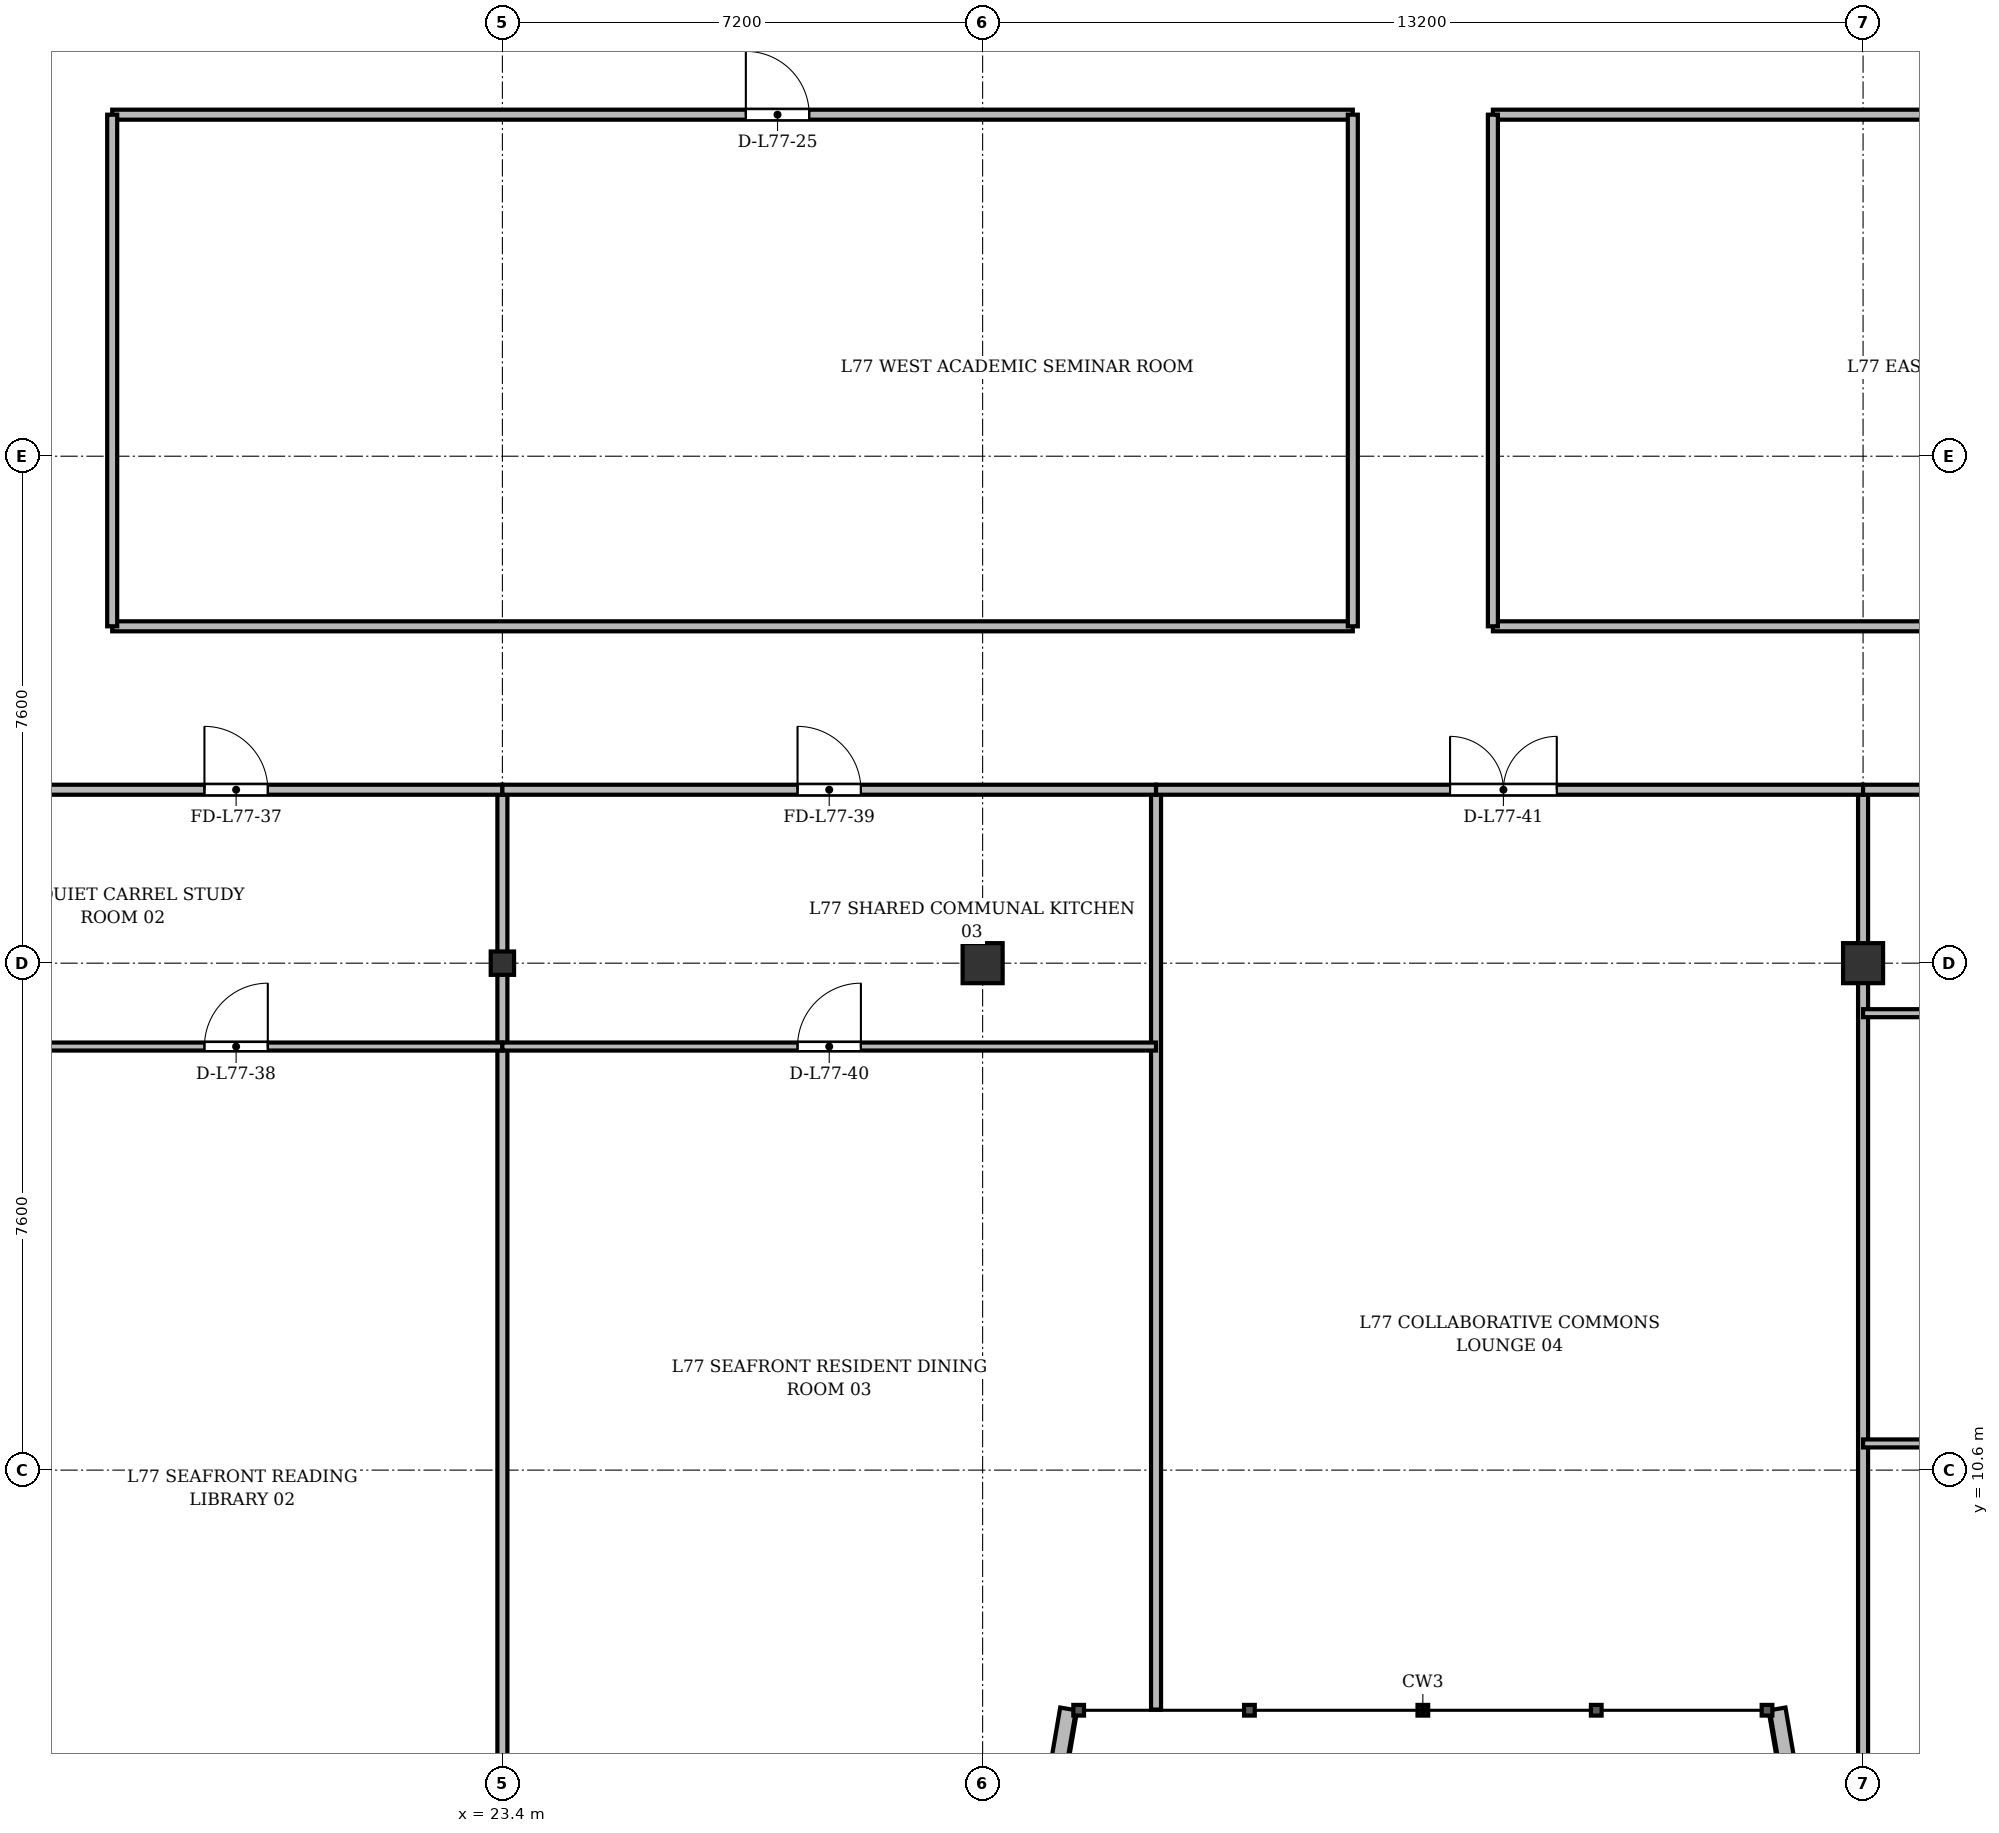
"""IFC4 building model, lengths in metres.
Left out: names, types, materials, properties, quantities, classifications, styles, units other than length and angle.
Written with IfcOpenShell. Run it as: python <this file> out.ifc"""

import sys

from ifc_helpers import new_model, si_unit, direction, frame, frame_2d, origin, origin_2d, place, context, subcontext, project, spatial, rectangle, i_section, extrude, source, transform, mapped, element, fill, save


model = new_model("IFC4")
c1 = context("Model", 3, precision=1e-05, world=origin(), true_north=direction((0.0, 1.0)))
c2 = subcontext(c1, "Body", "Model", "MODEL_VIEW")
j1 = project(units=[si_unit("LENGTHUNIT", "METRE"), si_unit("PLANEANGLEUNIT", "RADIAN")], contexts=[c1])
p1 = place(None, origin())
s1 = spatial("IfcSite", under=j1, at=p1, CompositionType="ELEMENT")
p2 = place(p1, origin())
s2 = spatial("IfcBuilding", under=s1, at=p2, CompositionType="ELEMENT")
p3 = place(p2, frame((0.0, 0.0, 295.5)))
s3 = spatial("IfcBuildingStorey", under=s2, at=p3, CompositionType="ELEMENT", Elevation=295.5)
m1 = source(origin(), c2, "Body", "SweptSolid", [
    extrude(i_section(OverallWidth=0.35, OverallDepth=0.35, WebThickness=0.018, FlangeThickness=0.028, at=origin_2d()), origin(), (0.0, 0.0, 1.0), 3.6),
])
p4 = place(p3, frame((23.4, 18.2, 0.0), z_axis=(0.0, 0.0, 1.0), x_axis=(1.0, 0.0, 0.0)))
e1 = element("IfcColumn", 1, at=p4, inside=s3, PredefinedType="COLUMN", context=c2, shape_type="MappedRepresentation", body=[
    mapped(m1, transform((0.0, 0.0, 0.0), x_axis=(1.0, 0.0, 0.0), y_axis=(0.0, 1.0, 0.0), z_axis=(0.0, 0.0, 1.0), scale=1.0)),
])
m2 = source(origin(), c2, "Body", "SweptSolid", [
    extrude(rectangle(XDim=0.6, YDim=0.6, at=origin_2d()), origin(), (0.0, 0.0, 1.0), 3.6),
])
for number, where, z_axis, x_axis in (
    (2, (30.6, 18.2, 0.0), (0.0, 0.0, 1.0), (1.0, 0.0, 0.0)),
    (3, (43.8, 18.2, 0.0), (0.0, 0.0, 1.0), (1.0, 0.0, 0.0)),
):
    element("IfcColumn", number, at=place(p3, frame(where, z_axis=z_axis, x_axis=x_axis)), inside=s3, PredefinedType="COLUMN", context=c2, shape_type="MappedRepresentation", body=[
        mapped(m2, transform((0.0, 0.0, 0.0), x_axis=(1.0, 0.0, 0.0), y_axis=(0.0, 1.0, 0.0), z_axis=(0.0, 0.0, 1.0), scale=1.0)),
    ])
for number, where, z_axis, x_axis in (
    (4, (43.118, 3.52, 0.0), (0.0, 0.0, 1.0), (-0.169, 0.986, 0.0)),
    (5, (31.882, 7.02, 0.0), (0.0, 0.0, 1.0), (-0.169, -0.986, 0.0)),
):
    element("IfcWall", number, at=place(p3, frame(where, z_axis=z_axis, x_axis=x_axis)), inside=s3, PredefinedType="SOLIDWALL", context=c2, shape_type="SweptSolid", body=[
        extrude(rectangle(XDim=3.551, YDim=0.24, at=frame_2d((1.775, 0.0))), origin(), (0.0, 0.0, 1.0), 2.81),
    ])
p5 = place(p3, frame((17.55, 30.92, 0.0), z_axis=(0.0, 0.0, 1.0), x_axis=(1.0, 0.0, 0.0)))
e6 = element("IfcWall", 6, at=p5, inside=s3, PredefinedType="PARTITIONING", context=c2, shape_type="SweptSolid", body=[
    extrude(rectangle(XDim=18.6, YDim=0.15, at=frame_2d((9.3, 0.0))), origin(), (0.0, 0.0, 1.0), 2.76),
])
p6 = place(p5, frame((9.5, 0.0, 0.0)))
e7 = element("IfcOpeningElement", 7, at=p6, cuts=e6, PredefinedType="OPENING", context=c2, shape_type="SweptSolid", body=[
    extrude(rectangle(XDim=0.95, YDim=2.15, at=frame_2d((0.475, 1.075))), frame((0.0, 0.085, 0.0), z_axis=(0.0, -1.0, 0.0), x_axis=(1.0, 0.0, 0.0)), (0.0, 0.0, 1.0), 0.17),
])
p7 = place(p3, frame((17.55, 23.25, 0.0), z_axis=(0.0, 0.0, 1.0), x_axis=(1.0, 0.0, 0.0)))
e8 = element("IfcWall", 8, at=p7, inside=s3, PredefinedType="PARTITIONING", context=c2, shape_type="SweptSolid", body=[
    extrude(rectangle(XDim=18.6, YDim=0.15, at=frame_2d((9.3, 0.0))), origin(), (0.0, 0.0, 1.0), 2.76),
])
for number, where, z_axis, x_axis in (
    (9, (17.55, 23.25, 0.0), (0.0, 0.0, 1.0), (0.0, 1.0, 0.0)),
    (10, (36.15, 23.25, 0.0), (0.0, 0.0, 1.0), (0.0, 1.0, 0.0)),
):
    element("IfcWall", number, at=place(p3, frame(where, z_axis=z_axis, x_axis=x_axis)), inside=s3, PredefinedType="PARTITIONING", context=c2, shape_type="SweptSolid", body=[
        extrude(rectangle(XDim=7.67, YDim=0.15, at=frame_2d((3.835, 0.0))), origin(), (0.0, 0.0, 1.0), 2.96),
    ])
p8 = place(p3, frame((38.25, 30.92, 0.0), z_axis=(0.0, 0.0, 1.0), x_axis=(1.0, 0.0, 0.0)))
e11 = element("IfcWall", 11, at=p8, inside=s3, PredefinedType="PARTITIONING", context=c2, shape_type="SweptSolid", body=[
    extrude(rectangle(XDim=18.6, YDim=0.15, at=frame_2d((9.3, 0.0))), origin(), (0.0, 0.0, 1.0), 2.76),
])
p9 = place(p8, frame((9.5, 0.0, 0.0)))
e12 = element("IfcOpeningElement", 12, at=p9, cuts=e11, PredefinedType="OPENING", context=c2, shape_type="SweptSolid", body=[
    extrude(rectangle(XDim=0.95, YDim=2.15, at=frame_2d((0.475, 1.075))), frame((0.0, 0.085, 0.0), z_axis=(0.0, -1.0, 0.0), x_axis=(1.0, 0.0, 0.0)), (0.0, 0.0, 1.0), 0.17),
])
p10 = place(p3, frame((38.25, 23.25, 0.0), z_axis=(0.0, 0.0, 1.0), x_axis=(1.0, 0.0, 0.0)))
e13 = element("IfcWall", 13, at=p10, inside=s3, PredefinedType="PARTITIONING", context=c2, shape_type="SweptSolid", body=[
    extrude(rectangle(XDim=18.6, YDim=0.15, at=frame_2d((9.3, 0.0))), origin(), (0.0, 0.0, 1.0), 2.76),
])
p11 = place(p3, frame((38.25, 23.25, 0.0), z_axis=(0.0, 0.0, 1.0), x_axis=(0.0, 1.0, 0.0)))
e14 = element("IfcWall", 14, at=p11, inside=s3, PredefinedType="PARTITIONING", context=c2, shape_type="SweptSolid", body=[
    extrude(rectangle(XDim=7.67, YDim=0.15, at=frame_2d((3.835, 0.0))), origin(), (0.0, 0.0, 1.0), 2.96),
])
p12 = place(p3, frame((23.4, 3.725, 0.0), z_axis=(0.0, 0.0, 1.0), x_axis=(0.0, 1.0, 0.0)))
e15 = element("IfcWall", 15, at=p12, inside=s3, PredefinedType="PARTITIONING", context=c2, shape_type="SweptSolid", body=[
    extrude(rectangle(XDim=17.075, YDim=0.15, at=frame_2d((8.538, 0.0))), origin(), (0.0, 0.0, 1.0), 2.76),
])
p13 = place(p3, frame((33.2, 7.01, 0.0), z_axis=(0.0, 0.0, 1.0), x_axis=(0.0, 1.0, 0.0)))
e16 = element("IfcWall", 16, at=p13, inside=s3, PredefinedType="PARTITIONING", context=c2, shape_type="SweptSolid", body=[
    extrude(rectangle(XDim=13.79, YDim=0.15, at=frame_2d((6.895, 0.0))), origin(), (0.0, 0.0, 1.0), 2.81),
])
p14 = place(p3, frame((43.8, 3.725, 0.0), z_axis=(0.0, 0.0, 1.0), x_axis=(0.0, 1.0, 0.0)))
e17 = element("IfcWall", 17, at=p14, inside=s3, PredefinedType="PARTITIONING", context=c2, shape_type="SweptSolid", body=[
    extrude(rectangle(XDim=17.075, YDim=0.15, at=frame_2d((8.538, 0.0))), origin(), (0.0, 0.0, 1.0), 2.76),
])
p15 = place(p3, frame((15.6, 20.8, 0.0), z_axis=(0.0, 0.0, 1.0), x_axis=(1.0, 0.0, 0.0)))
e18 = element("IfcWall", 18, at=p15, inside=s3, PredefinedType="PARTITIONING", context=c2, shape_type="SweptSolid", body=[
    extrude(rectangle(XDim=7.8, YDim=0.15, at=frame_2d((3.9, 0.0))), origin(), (0.0, 0.0, 1.0), 2.76),
])
p16 = place(p15, frame((3.333, 0.0, 0.0)))
e19 = element("IfcOpeningElement", 19, at=p16, cuts=e18, PredefinedType="OPENING", context=c2, shape_type="SweptSolid", body=[
    extrude(rectangle(XDim=0.95, YDim=2.15, at=frame_2d((0.475, 1.075))), frame((0.0, 0.085, 0.0), z_axis=(0.0, -1.0, 0.0), x_axis=(1.0, 0.0, 0.0)), (0.0, 0.0, 1.0), 0.17),
])
p17 = place(p3, frame((15.6, 16.95, 0.0), z_axis=(0.0, 0.0, 1.0), x_axis=(1.0, 0.0, 0.0)))
e20 = element("IfcWall", 20, at=p17, inside=s3, PredefinedType="PARTITIONING", context=c2, shape_type="SweptSolid", body=[
    extrude(rectangle(XDim=7.8, YDim=0.12, at=frame_2d((3.9, 0.0))), origin(), (0.0, 0.0, 1.0), 2.76),
])
p18 = place(p17, frame((3.333, 0.0, 0.0)))
e21 = element("IfcOpeningElement", 21, at=p18, cuts=e20, PredefinedType="OPENING", context=c2, shape_type="SweptSolid", body=[
    extrude(rectangle(XDim=0.95, YDim=2.15, at=frame_2d((0.475, 1.075))), frame((0.0, 0.07, 0.0), z_axis=(0.0, -1.0, 0.0), x_axis=(1.0, 0.0, 0.0)), (0.0, 0.0, 1.0), 0.14),
])
p19 = place(p3, frame((23.4, 20.8, 0.0), z_axis=(0.0, 0.0, 1.0), x_axis=(1.0, 0.0, 0.0)))
e22 = element("IfcWall", 22, at=p19, inside=s3, PredefinedType="PARTITIONING", context=c2, shape_type="SweptSolid", body=[
    extrude(rectangle(XDim=9.8, YDim=0.15, at=frame_2d((4.9, 0.0))), origin(), (0.0, 0.0, 1.0), 2.76),
])
p20 = place(p19, frame((4.425, 0.0, 0.0)))
e23 = element("IfcOpeningElement", 23, at=p20, cuts=e22, PredefinedType="OPENING", context=c2, shape_type="SweptSolid", body=[
    extrude(rectangle(XDim=0.95, YDim=2.15, at=frame_2d((0.475, 1.075))), frame((0.0, 0.085, 0.0), z_axis=(0.0, -1.0, 0.0), x_axis=(1.0, 0.0, 0.0)), (0.0, 0.0, 1.0), 0.17),
])
p21 = place(p3, frame((23.4, 16.95, 0.0), z_axis=(0.0, 0.0, 1.0), x_axis=(1.0, 0.0, 0.0)))
e24 = element("IfcWall", 24, at=p21, inside=s3, PredefinedType="PARTITIONING", context=c2, shape_type="SweptSolid", body=[
    extrude(rectangle(XDim=9.8, YDim=0.12, at=frame_2d((4.9, 0.0))), origin(), (0.0, 0.0, 1.0), 2.76),
])
p22 = place(p21, frame((4.425, 0.0, 0.0)))
e25 = element("IfcOpeningElement", 25, at=p22, cuts=e24, PredefinedType="OPENING", context=c2, shape_type="SweptSolid", body=[
    extrude(rectangle(XDim=0.95, YDim=2.15, at=frame_2d((0.475, 1.075))), frame((0.0, 0.07, 0.0), z_axis=(0.0, -1.0, 0.0), x_axis=(1.0, 0.0, 0.0)), (0.0, 0.0, 1.0), 0.14),
])
p23 = place(p3, frame((33.2, 20.8, 0.0), z_axis=(0.0, 0.0, 1.0), x_axis=(1.0, 0.0, 0.0)))
e26 = element("IfcWall", 26, at=p23, inside=s3, PredefinedType="PARTITIONING", context=c2, shape_type="SweptSolid", body=[
    extrude(rectangle(XDim=10.6, YDim=0.15, at=frame_2d((5.3, 0.0))), origin(), (0.0, 0.0, 1.0), 2.76),
])
p24 = place(p23, frame((4.408, 0.0, 0.0)))
e27 = element("IfcOpeningElement", 27, at=p24, cuts=e26, PredefinedType="OPENING", context=c2, shape_type="SweptSolid", body=[
    extrude(rectangle(XDim=1.6, YDim=2.2, at=frame_2d((0.8, 1.1))), frame((0.0, 0.085, 0.0), z_axis=(0.0, -1.0, 0.0), x_axis=(1.0, 0.0, 0.0)), (0.0, 0.0, 1.0), 0.17),
])
p25 = place(p3, frame((43.8, 17.45, 0.0), z_axis=(0.0, 0.0, 1.0), x_axis=(1.0, 0.0, 0.0)))
e28 = element("IfcWall", 28, at=p25, inside=s3, PredefinedType="PARTITIONING", context=c2, shape_type="SweptSolid", body=[
    extrude(rectangle(XDim=2.4, YDim=0.12, at=frame_2d((1.2, 0.0))), origin(), (0.0, 0.0, 1.0), 2.76),
])
p26 = place(p3, frame((43.8, 20.8, 0.0), z_axis=(0.0, 0.0, 1.0), x_axis=(1.0, 0.0, 0.0)))
e29 = element("IfcWall", 29, at=p26, inside=s3, PredefinedType="PARTITIONING", context=c2, shape_type="SweptSolid", body=[
    extrude(rectangle(XDim=7.2, YDim=0.15, at=frame_2d((3.6, 0.0))), origin(), (0.0, 0.0, 1.0), 2.76),
])
p27 = place(p26, frame((4.706, 0.0, 0.0)))
e30 = element("IfcOpeningElement", 30, at=p27, cuts=e29, PredefinedType="OPENING", context=c2, shape_type="SweptSolid", body=[
    extrude(rectangle(XDim=0.95, YDim=2.15, at=frame_2d((0.475, 1.075))), frame((0.0, 0.085, 0.0), z_axis=(0.0, -1.0, 0.0), x_axis=(1.0, 0.0, 0.0)), (0.0, 0.0, 1.0), 0.17),
])
p28 = place(p3, frame((43.8, 11.0, 0.0), z_axis=(0.0, 0.0, 1.0), x_axis=(1.0, 0.0, 0.0)))
e31 = element("IfcWall", 31, at=p28, inside=s3, PredefinedType="PARTITIONING", context=c2, shape_type="SweptSolid", body=[
    extrude(rectangle(XDim=3.6, YDim=0.12, at=frame_2d((1.8, 0.0))), origin(), (0.0, 0.0, 1.0), 2.76),
])
p29 = place(p28, frame((1.325, 0.0, 0.0)))
e32 = element("IfcOpeningElement", 32, at=p29, cuts=e31, PredefinedType="OPENING", context=c2, shape_type="SweptSolid", body=[
    extrude(rectangle(XDim=0.95, YDim=2.15, at=frame_2d((0.475, 1.075))), frame((0.0, 0.07, 0.0), z_axis=(0.0, -1.0, 0.0), x_axis=(1.0, 0.0, 0.0)), (0.0, 0.0, 1.0), 0.14),
])
m3 = source(origin(), c2, "Body", "SweptSolid", [
    extrude(rectangle(XDim=0.95, YDim=2.15, at=frame_2d((0.475, 1.075))), frame((0.0, 0.025, 0.0), z_axis=(0.0, -1.0, 0.0), x_axis=(1.0, 0.0, 0.0)), (0.0, 0.0, 1.0), 0.05),
])
p30 = place(p6, origin())
e33 = element("IfcDoor", 33, at=p30, inside=s3, OperationType="SINGLE_SWING_LEFT", PredefinedType="DOOR", context=c2, shape_type="MappedRepresentation", body=[
    mapped(m3, transform((0.0, 0.0, 0.0), x_axis=(1.0, 0.0, 0.0), y_axis=(0.0, 1.0, 0.0), z_axis=(0.0, 0.0, 1.0), scale=1.0)),
])
fill(e7, e33)
p31 = place(p16, origin())
e34 = element("IfcDoor", 34, at=p31, inside=s3, OperationType="SINGLE_SWING_LEFT", PredefinedType="DOOR", context=c2, shape_type="MappedRepresentation", body=[
    mapped(m3, transform((0.0, 0.0, 0.0), x_axis=(1.0, 0.0, 0.0), y_axis=(0.0, 1.0, 0.0), z_axis=(0.0, 0.0, 1.0), scale=1.0)),
])
fill(e19, e34)
p32 = place(p18, origin())
e35 = element("IfcDoor", 35, at=p32, inside=s3, OperationType="SINGLE_SWING_RIGHT", PredefinedType="DOOR", context=c2, shape_type="MappedRepresentation", body=[
    mapped(m3, transform((0.0, 0.0, 0.0), x_axis=(1.0, 0.0, 0.0), y_axis=(0.0, 1.0, 0.0), z_axis=(0.0, 0.0, 1.0), scale=1.0)),
])
fill(e21, e35)
p33 = place(p20, origin())
e36 = element("IfcDoor", 36, at=p33, inside=s3, OperationType="SINGLE_SWING_LEFT", PredefinedType="DOOR", context=c2, shape_type="MappedRepresentation", body=[
    mapped(m3, transform((0.0, 0.0, 0.0), x_axis=(1.0, 0.0, 0.0), y_axis=(0.0, 1.0, 0.0), z_axis=(0.0, 0.0, 1.0), scale=1.0)),
])
fill(e23, e36)
p34 = place(p22, origin())
e37 = element("IfcDoor", 37, at=p34, inside=s3, OperationType="SINGLE_SWING_RIGHT", PredefinedType="DOOR", context=c2, shape_type="MappedRepresentation", body=[
    mapped(m3, transform((0.0, 0.0, 0.0), x_axis=(1.0, 0.0, 0.0), y_axis=(0.0, 1.0, 0.0), z_axis=(0.0, 0.0, 1.0), scale=1.0)),
])
fill(e25, e37)
m4 = source(origin(), c2, "Body", "SweptSolid", [
    extrude(rectangle(XDim=1.6, YDim=2.2, at=frame_2d((0.8, 1.1))), frame((0.0, 0.025, 0.0), z_axis=(0.0, -1.0, 0.0), x_axis=(1.0, 0.0, 0.0)), (0.0, 0.0, 1.0), 0.05),
])
p35 = place(p24, origin())
e38 = element("IfcDoor", 38, at=p35, inside=s3, OperationType="DOUBLE_DOOR_SINGLE_SWING", PredefinedType="DOOR", context=c2, shape_type="MappedRepresentation", body=[
    mapped(m4, transform((0.0, 0.0, 0.0), x_axis=(1.0, 0.0, 0.0), y_axis=(0.0, 1.0, 0.0), z_axis=(0.0, 0.0, 1.0), scale=1.0)),
])
fill(e27, e38)
save(model, sys.argv[1])
